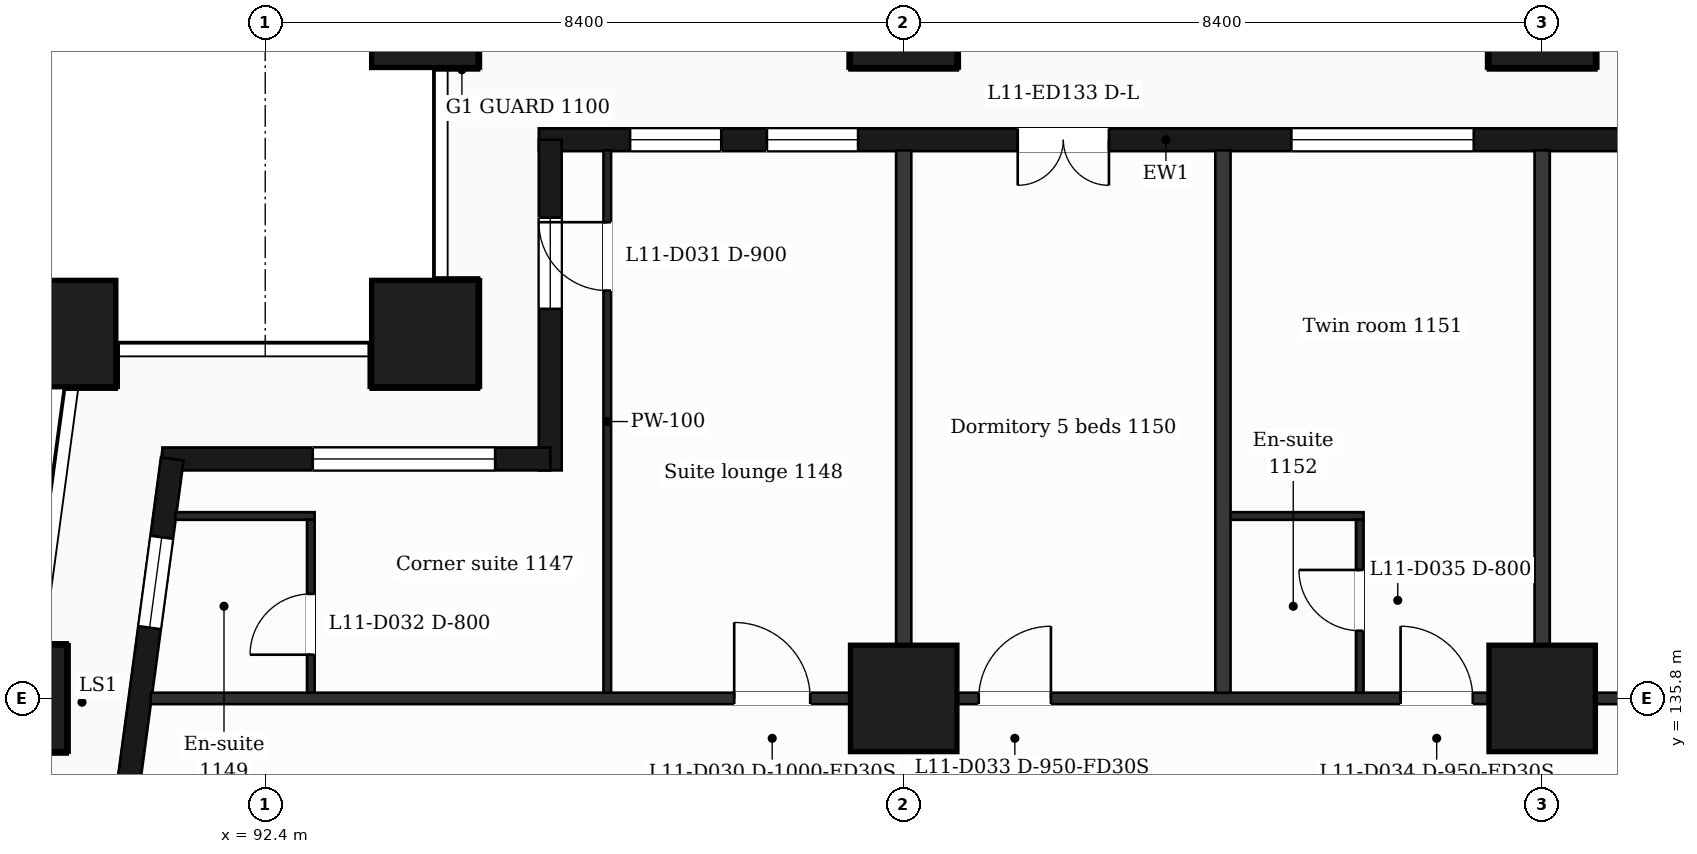
"""IFC4 building model, lengths in metres.
Left out: names, types, materials, properties, quantities, classifications, styles, units other than length and angle.
Written with IfcOpenShell. Run it as: python <this file> out.ifc"""

import sys

from ifc_helpers import new_model, si_unit, direction, frame, frame_2d, origin, origin_2d, place, context, subcontext, project, spatial, rectangle, extrude, element, fill, save


model = new_model("IFC4")
c1 = context("Model", 3, precision=1e-05, world=origin(), true_north=direction((0.0, 1.0)))
c2 = subcontext(c1, "Body", "Model", "MODEL_VIEW")
j1 = project(units=[si_unit("LENGTHUNIT", "METRE"), si_unit("PLANEANGLEUNIT", "RADIAN")], contexts=[c1])
p1 = place(None, origin())
s1 = spatial("IfcSite", under=j1, at=p1, CompositionType="ELEMENT")
p2 = place(p1, origin())
s2 = spatial("IfcBuilding", under=s1, at=p2, CompositionType="ELEMENT")
p3 = place(p2, frame((0.0, 0.0, 56.5)))
s3 = spatial("IfcBuildingStorey", under=s2, at=p3, CompositionType="ELEMENT", Elevation=56.5)
for number, where, z_axis, x_axis in (
    (1, (94.5, 140.6, 0.0), (0.0, 0.0, 1.0), (1.0, 0.0, 0.0)),
    (2, (89.735, 140.6, 0.0), (0.0, 0.0, 1.0), (1.0, 0.0, 0.0)),
    (3, (100.8, 135.8, 0.0), (0.0, 0.0, 1.0), (1.0, 0.0, 0.0)),
    (4, (109.2, 135.8, 0.0), (0.0, 0.0, 1.0), (1.0, 0.0, 0.0)),
    (5, (89.088, 135.8, 0.0), (0.0, 0.0, 1.0), (1.0, 0.0, 0.0)),
    (6, (100.8, 144.8, 0.0), (0.0, 0.0, 1.0), (1.0, 0.0, 0.0)),
    (7, (109.2, 144.8, 0.0), (0.0, 0.0, 1.0), (1.0, 0.0, 0.0)),
    (8, (94.5, 144.8, 0.0), (0.0, 0.0, 1.0), (1.0, 0.0, 0.0)),
):
    element("IfcColumn", number, at=place(p3, frame(where, z_axis=z_axis, x_axis=x_axis)), inside=s3, PredefinedType="COLUMN", context=c2, shape_type="SweptSolid", body=[
        extrude(rectangle(XDim=1.4, YDim=1.4, at=origin_2d()), origin(), (0.0, 0.0, 1.0), 3.5),
    ])
p4 = place(p3, frame((112.5, 143.15, 0.0), z_axis=(0.0, 0.0, 1.0), x_axis=(-1.0, 0.0, 0.0)))
e9 = element("IfcWall", 9, at=p4, inside=s3, PredefinedType="SOLIDWALL", context=c2, shape_type="SweptSolid", body=[
    extrude(rectangle(XDim=16.5, YDim=0.3, at=frame_2d((8.25, 0.0))), origin(), (0.0, 0.0, 1.0), 3.18),
])
p5 = place(p4, frame((1.1, 0.0, 0.9)))
e10 = element("IfcOpeningElement", 10, at=p5, cuts=e9, PredefinedType="OPENING", context=c2, shape_type="SweptSolid", body=[
    extrude(rectangle(XDim=1.2, YDim=2.1, at=frame_2d((0.6, 1.05))), frame((0.0, 0.16, 0.0), z_axis=(0.0, -1.0, 0.0), x_axis=(1.0, 0.0, 0.0)), (0.0, 0.0, 1.0), 0.32),
])
p6 = place(p4, frame((4.2, 0.0, 0.9)))
e11 = element("IfcOpeningElement", 11, at=p6, cuts=e9, PredefinedType="OPENING", context=c2, shape_type="SweptSolid", body=[
    extrude(rectangle(XDim=2.4, YDim=2.1, at=frame_2d((1.2, 1.05))), frame((0.0, 0.16, 0.0), z_axis=(0.0, -1.0, 0.0), x_axis=(1.0, 0.0, 0.0)), (0.0, 0.0, 1.0), 0.32),
])
p7 = place(p4, frame((9.0, 0.0, 0.0)))
e12 = element("IfcOpeningElement", 12, at=p7, cuts=e9, PredefinedType="OPENING", context=c2, shape_type="SweptSolid", body=[
    extrude(rectangle(XDim=1.2, YDim=2.4, at=frame_2d((0.6, 1.2))), frame((0.0, 0.16, 0.0), z_axis=(0.0, -1.0, 0.0), x_axis=(1.0, 0.0, 0.0)), (0.0, 0.0, 1.0), 0.32),
])
p8 = place(p4, frame((12.3, 0.0, 0.9)))
e13 = element("IfcOpeningElement", 13, at=p8, cuts=e9, PredefinedType="OPENING", context=c2, shape_type="SweptSolid", body=[
    extrude(rectangle(XDim=1.2, YDim=2.1, at=frame_2d((0.6, 1.05))), frame((0.0, 0.16, 0.0), z_axis=(0.0, -1.0, 0.0), x_axis=(1.0, 0.0, 0.0)), (0.0, 0.0, 1.0), 0.32),
])
p9 = place(p4, frame((14.1, 0.0, 0.9)))
e14 = element("IfcOpeningElement", 14, at=p9, cuts=e9, PredefinedType="OPENING", context=c2, shape_type="SweptSolid", body=[
    extrude(rectangle(XDim=1.2, YDim=2.1, at=frame_2d((0.6, 1.05))), frame((0.0, 0.16, 0.0), z_axis=(0.0, -1.0, 0.0), x_axis=(1.0, 0.0, 0.0)), (0.0, 0.0, 1.0), 0.32),
])
p10 = place(p3, frame((96.15, 143.15, 0.0), z_axis=(0.0, 0.0, 1.0), x_axis=(0.0, -1.0, 0.0)))
e15 = element("IfcWall", 15, at=p10, inside=s3, PredefinedType="SOLIDWALL", context=c2, shape_type="SweptSolid", body=[
    extrude(rectangle(XDim=4.35, YDim=0.3, at=frame_2d((2.175, 0.0))), origin(), (0.0, 0.0, 1.0), 3.18),
])
p11 = place(p10, frame((1.025, 0.0, 0.9)))
e16 = element("IfcOpeningElement", 16, at=p11, cuts=e15, PredefinedType="OPENING", context=c2, shape_type="SweptSolid", body=[
    extrude(rectangle(XDim=1.2, YDim=2.1, at=frame_2d((0.6, 1.05))), frame((0.0, 0.16, 0.0), z_axis=(0.0, -1.0, 0.0), x_axis=(1.0, 0.0, 0.0)), (0.0, 0.0, 1.0), 0.32),
])
p12 = place(p3, frame((96.15, 138.95, 0.0), z_axis=(0.0, 0.0, 1.0), x_axis=(-1.0, 0.0, 0.0)))
e17 = element("IfcWall", 17, at=p12, inside=s3, PredefinedType="SOLIDWALL", context=c2, shape_type="SweptSolid", body=[
    extrude(rectangle(XDim=5.104, YDim=0.3, at=frame_2d((2.552, 0.0))), origin(), (0.0, 0.0, 1.0), 3.18),
])
p13 = place(p12, frame((0.725, 0.0, 0.9)))
e18 = element("IfcOpeningElement", 18, at=p13, cuts=e17, PredefinedType="OPENING", context=c2, shape_type="SweptSolid", body=[
    extrude(rectangle(XDim=2.4, YDim=2.1, at=frame_2d((1.2, 1.05))), frame((0.0, 0.16, 0.0), z_axis=(0.0, -1.0, 0.0), x_axis=(1.0, 0.0, 0.0)), (0.0, 0.0, 1.0), 0.32),
])
p14 = place(p3, frame((91.177, 138.95, 0.0), z_axis=(0.0, 0.0, 1.0), x_axis=(-0.133426664613, -0.991058689065, 0.0)))
e19 = element("IfcWall", 19, at=p14, inside=s3, PredefinedType="SOLIDWALL", context=c2, shape_type="SweptSolid", body=[
    extrude(rectangle(XDim=6.609, YDim=0.3, at=frame_2d((3.305, 0.0))), origin(), (0.0, 0.0, 1.0), 3.18),
])
p15 = place(p14, frame((1.039, 0.0, 0.9)))
e20 = element("IfcOpeningElement", 20, at=p15, cuts=e19, PredefinedType="OPENING", context=c2, shape_type="SweptSolid", body=[
    extrude(rectangle(XDim=1.2, YDim=2.1, at=frame_2d((0.6, 1.05))), frame((0.0, 0.16, 0.0), z_axis=(0.0, -1.0, 0.0), x_axis=(1.0, 0.0, 0.0)), (0.0, 0.0, 1.0), 0.32),
])
p16 = place(p14, frame((4.294, 0.0, 0.0)))
e21 = element("IfcOpeningElement", 21, at=p16, cuts=e19, PredefinedType="OPENING", context=c2, shape_type="SweptSolid", body=[
    extrude(rectangle(XDim=1.2, YDim=2.4, at=frame_2d((0.6, 1.2))), frame((0.0, 0.16, 0.0), z_axis=(0.0, -1.0, 0.0), x_axis=(1.0, 0.0, 0.0)), (0.0, 0.0, 1.0), 0.32),
])
p17 = place(p3, frame((90.895, 135.8, 0.0), z_axis=(0.0, 0.0, 1.0), x_axis=(1.0, 0.0, 0.0)))
e22 = element("IfcWall", 22, at=p17, inside=s3, PredefinedType="PARTITIONING", context=c2, shape_type="SweptSolid", body=[
    extrude(rectangle(XDim=45.011, YDim=0.15, at=frame_2d((22.505, 0.0))), origin(), (0.0, 0.0, 1.0), 3.18),
])
p18 = place(p17, frame((7.675, 0.0, 0.0)))
e23 = element("IfcOpeningElement", 23, at=p18, cuts=e22, PredefinedType="OPENING", context=c2, shape_type="SweptSolid", body=[
    extrude(rectangle(XDim=1.0, YDim=2.1, at=frame_2d((0.5, 1.05))), frame((0.0, 0.085, 0.0), z_axis=(0.0, -1.0, 0.0), x_axis=(1.0, 0.0, 0.0)), (0.0, 0.0, 1.0), 0.17),
])
p19 = place(p17, frame((10.892, 0.0, 0.0)))
e24 = element("IfcOpeningElement", 24, at=p19, cuts=e22, PredefinedType="OPENING", context=c2, shape_type="SweptSolid", body=[
    extrude(rectangle(XDim=0.95, YDim=2.1, at=frame_2d((0.475, 1.05))), frame((0.0, 0.085, 0.0), z_axis=(0.0, -1.0, 0.0), x_axis=(1.0, 0.0, 0.0)), (0.0, 0.0, 1.0), 0.17),
])
p20 = place(p17, frame((16.442, 0.0, 0.0)))
e25 = element("IfcOpeningElement", 25, at=p20, cuts=e22, PredefinedType="OPENING", context=c2, shape_type="SweptSolid", body=[
    extrude(rectangle(XDim=0.95, YDim=2.1, at=frame_2d((0.475, 1.05))), frame((0.0, 0.085, 0.0), z_axis=(0.0, -1.0, 0.0), x_axis=(1.0, 0.0, 0.0)), (0.0, 0.0, 1.0), 0.17),
])
p21 = place(p17, frame((22.368, 0.0, 0.0)))
e26 = element("IfcOpeningElement", 26, at=p21, cuts=e22, PredefinedType="OPENING", context=c2, shape_type="SweptSolid", body=[
    extrude(rectangle(XDim=0.95, YDim=2.1, at=frame_2d((0.475, 1.05))), frame((0.0, 0.085, 0.0), z_axis=(0.0, -1.0, 0.0), x_axis=(1.0, 0.0, 0.0)), (0.0, 0.0, 1.0), 0.17),
])
p22 = place(p17, frame((31.825, 0.0, 0.0)))
e27 = element("IfcOpeningElement", 27, at=p22, cuts=e22, PredefinedType="OPENING", context=c2, shape_type="SweptSolid", body=[
    extrude(rectangle(XDim=0.95, YDim=2.1, at=frame_2d((0.475, 1.05))), frame((0.0, 0.085, 0.0), z_axis=(0.0, -1.0, 0.0), x_axis=(1.0, 0.0, 0.0)), (0.0, 0.0, 1.0), 0.17),
])
p23 = place(p17, frame((36.775, 0.0, 0.0)))
e28 = element("IfcOpeningElement", 28, at=p23, cuts=e22, PredefinedType="OPENING", context=c2, shape_type="SweptSolid", body=[
    extrude(rectangle(XDim=1.0, YDim=2.1, at=frame_2d((0.5, 1.05))), frame((0.0, 0.085, 0.0), z_axis=(0.0, -1.0, 0.0), x_axis=(1.0, 0.0, 0.0)), (0.0, 0.0, 1.0), 0.17),
])
p24 = place(p3, frame((91.218, 138.2, 0.0), z_axis=(0.0, 0.0, 1.0), x_axis=(1.0, 0.0, 0.0)))
e29 = element("IfcWall", 29, at=p24, inside=s3, PredefinedType="PARTITIONING", context=c2, shape_type="SweptSolid", body=[
    extrude(rectangle(XDim=1.832, YDim=0.1, at=frame_2d((0.916, 0.0))), origin(), (0.0, 0.0, 1.0), 3.18),
])
p25 = place(p3, frame((105.0, 138.2, 0.0), z_axis=(0.0, 0.0, 1.0), x_axis=(1.0, 0.0, 0.0)))
e30 = element("IfcWall", 30, at=p25, inside=s3, PredefinedType="PARTITIONING", context=c2, shape_type="SweptSolid", body=[
    extrude(rectangle(XDim=1.85, YDim=0.1, at=frame_2d((0.925, 0.0))), origin(), (0.0, 0.0, 1.0), 3.18),
])
p26 = place(p3, frame((93.0, 135.875, 0.0), z_axis=(0.0, 0.0, 1.0), x_axis=(0.0, 1.0, 0.0)))
e31 = element("IfcWall", 31, at=p26, inside=s3, PredefinedType="PARTITIONING", context=c2, shape_type="SweptSolid", body=[
    extrude(rectangle(XDim=2.275, YDim=0.1, at=frame_2d((1.137, 0.0))), origin(), (0.0, 0.0, 1.0), 3.18),
])
p27 = place(p26, frame((0.5, 0.0, 0.0)))
e32 = element("IfcOpeningElement", 32, at=p27, cuts=e31, PredefinedType="OPENING", context=c2, shape_type="SweptSolid", body=[
    extrude(rectangle(XDim=0.8, YDim=2.1, at=frame_2d((0.4, 1.05))), frame((0.0, 0.06, 0.0), z_axis=(0.0, -1.0, 0.0), x_axis=(1.0, 0.0, 0.0)), (0.0, 0.0, 1.0), 0.12),
])
p28 = place(p3, frame((96.9, 135.875, 0.0), z_axis=(0.0, 0.0, 1.0), x_axis=(0.0, 1.0, 0.0)))
e33 = element("IfcWall", 33, at=p28, inside=s3, PredefinedType="PARTITIONING", context=c2, shape_type="SweptSolid", body=[
    extrude(rectangle(XDim=7.135, YDim=0.1, at=frame_2d((3.567, 0.0))), origin(), (0.0, 0.0, 1.0), 3.18),
])
p29 = place(p28, frame((5.29, 0.0, 0.0)))
e34 = element("IfcOpeningElement", 34, at=p29, cuts=e33, PredefinedType="OPENING", context=c2, shape_type="SweptSolid", body=[
    extrude(rectangle(XDim=0.9, YDim=2.1, at=frame_2d((0.45, 1.05))), frame((0.0, 0.06, 0.0), z_axis=(0.0, -1.0, 0.0), x_axis=(1.0, 0.0, 0.0)), (0.0, 0.0, 1.0), 0.12),
])
for number, where, z_axis, x_axis in (
    (35, (100.8, 135.875, 0.0), (0.0, 0.0, 1.0), (0.0, 1.0, 0.0)),
    (36, (105.0, 135.875, 0.0), (0.0, 0.0, 1.0), (0.0, 1.0, 0.0)),
):
    element("IfcWall", number, at=place(p3, frame(where, z_axis=z_axis, x_axis=x_axis)), inside=s3, PredefinedType="PARTITIONING", context=c2, shape_type="SweptSolid", body=[
        extrude(rectangle(XDim=7.135, YDim=0.2, at=frame_2d((3.567, 0.0))), origin(), (0.0, 0.0, 1.0), 3.18),
    ])
p30 = place(p3, frame((106.8, 135.875, 0.0), z_axis=(0.0, 0.0, 1.0), x_axis=(0.0, 1.0, 0.0)))
e37 = element("IfcWall", 37, at=p30, inside=s3, PredefinedType="PARTITIONING", context=c2, shape_type="SweptSolid", body=[
    extrude(rectangle(XDim=2.275, YDim=0.1, at=frame_2d((1.137, 0.0))), origin(), (0.0, 0.0, 1.0), 3.18),
])
p31 = place(p30, frame((0.815, 0.0, 0.0)))
e38 = element("IfcOpeningElement", 38, at=p31, cuts=e37, PredefinedType="OPENING", context=c2, shape_type="SweptSolid", body=[
    extrude(rectangle(XDim=0.8, YDim=2.1, at=frame_2d((0.4, 1.05))), frame((0.0, 0.06, 0.0), z_axis=(0.0, -1.0, 0.0), x_axis=(1.0, 0.0, 0.0)), (0.0, 0.0, 1.0), 0.12),
])
p32 = place(p3, frame((109.2, 135.875, 0.0), z_axis=(0.0, 0.0, 1.0), x_axis=(0.0, 1.0, 0.0)))
e39 = element("IfcWall", 39, at=p32, inside=s3, PredefinedType="PARTITIONING", context=c2, shape_type="SweptSolid", body=[
    extrude(rectangle(XDim=7.135, YDim=0.2, at=frame_2d((3.567, 0.0))), origin(), (0.0, 0.0, 1.0), 3.18),
])
p33 = place(p5, origin())
e40 = element("IfcWindow", 40, at=p33, inside=s3, PartitioningType="SINGLE_PANEL", PredefinedType="WINDOW", context=c2, shape_type="SweptSolid", body=[
    extrude(rectangle(XDim=1.2, YDim=2.1, at=frame_2d((0.6, 1.05))), frame((0.0, 0.03, 0.0), z_axis=(0.0, -1.0, 0.0), x_axis=(1.0, 0.0, 0.0)), (0.0, 0.0, 1.0), 0.06),
])
fill(e10, e40)
p34 = place(p6, origin())
e41 = element("IfcWindow", 41, at=p34, inside=s3, PartitioningType="SINGLE_PANEL", PredefinedType="WINDOW", context=c2, shape_type="SweptSolid", body=[
    extrude(rectangle(XDim=2.4, YDim=2.1, at=frame_2d((1.2, 1.05))), frame((0.0, 0.03, 0.0), z_axis=(0.0, -1.0, 0.0), x_axis=(1.0, 0.0, 0.0)), (0.0, 0.0, 1.0), 0.06),
])
fill(e11, e41)
p35 = place(p7, origin())
e42 = element("IfcDoor", 42, at=p35, inside=s3, OperationType="DOUBLE_DOOR_SINGLE_SWING", PredefinedType="DOOR", context=c2, shape_type="SweptSolid", body=[
    extrude(rectangle(XDim=1.2, YDim=2.4, at=frame_2d((0.6, 1.2))), frame((0.0, 0.025, 0.0), z_axis=(0.0, -1.0, 0.0), x_axis=(1.0, 0.0, 0.0)), (0.0, 0.0, 1.0), 0.05),
])
fill(e12, e42)
p36 = place(p8, origin())
e43 = element("IfcWindow", 43, at=p36, inside=s3, PartitioningType="SINGLE_PANEL", PredefinedType="WINDOW", context=c2, shape_type="SweptSolid", body=[
    extrude(rectangle(XDim=1.2, YDim=2.1, at=frame_2d((0.6, 1.05))), frame((0.0, 0.03, 0.0), z_axis=(0.0, -1.0, 0.0), x_axis=(1.0, 0.0, 0.0)), (0.0, 0.0, 1.0), 0.06),
])
fill(e13, e43)
p37 = place(p9, origin())
e44 = element("IfcWindow", 44, at=p37, inside=s3, PartitioningType="SINGLE_PANEL", PredefinedType="WINDOW", context=c2, shape_type="SweptSolid", body=[
    extrude(rectangle(XDim=1.2, YDim=2.1, at=frame_2d((0.6, 1.05))), frame((0.0, 0.03, 0.0), z_axis=(0.0, -1.0, 0.0), x_axis=(1.0, 0.0, 0.0)), (0.0, 0.0, 1.0), 0.06),
])
fill(e14, e44)
p38 = place(p11, origin())
e45 = element("IfcWindow", 45, at=p38, inside=s3, PartitioningType="SINGLE_PANEL", PredefinedType="WINDOW", context=c2, shape_type="SweptSolid", body=[
    extrude(rectangle(XDim=1.2, YDim=2.1, at=frame_2d((0.6, 1.05))), frame((0.0, 0.03, 0.0), z_axis=(0.0, -1.0, 0.0), x_axis=(1.0, 0.0, 0.0)), (0.0, 0.0, 1.0), 0.06),
])
fill(e16, e45)
p39 = place(p13, origin())
e46 = element("IfcWindow", 46, at=p39, inside=s3, PartitioningType="SINGLE_PANEL", PredefinedType="WINDOW", context=c2, shape_type="SweptSolid", body=[
    extrude(rectangle(XDim=2.4, YDim=2.1, at=frame_2d((1.2, 1.05))), frame((0.0, 0.03, 0.0), z_axis=(0.0, -1.0, 0.0), x_axis=(1.0, 0.0, 0.0)), (0.0, 0.0, 1.0), 0.06),
])
fill(e18, e46)
p40 = place(p15, origin())
e47 = element("IfcWindow", 47, at=p40, inside=s3, PartitioningType="SINGLE_PANEL", PredefinedType="WINDOW", context=c2, shape_type="SweptSolid", body=[
    extrude(rectangle(XDim=1.2, YDim=2.1, at=frame_2d((0.6, 1.05))), frame((0.0, 0.03, 0.0), z_axis=(0.0, -1.0, 0.0), x_axis=(1.0, 0.0, 0.0)), (0.0, 0.0, 1.0), 0.06),
])
fill(e20, e47)
p41 = place(p18, origin())
e48 = element("IfcDoor", 48, at=p41, inside=s3, OperationType="SINGLE_SWING_LEFT", PredefinedType="DOOR", context=c2, shape_type="SweptSolid", body=[
    extrude(rectangle(XDim=1.0, YDim=2.1, at=frame_2d((0.5, 1.05))), frame((0.0, 0.025, 0.0), z_axis=(0.0, -1.0, 0.0), x_axis=(1.0, 0.0, 0.0)), (0.0, 0.0, 1.0), 0.05),
])
fill(e23, e48)
p42 = place(p29, origin())
e49 = element("IfcDoor", 49, at=p42, inside=s3, OperationType="SINGLE_SWING_RIGHT", PredefinedType="DOOR", context=c2, shape_type="SweptSolid", body=[
    extrude(rectangle(XDim=0.9, YDim=2.1, at=frame_2d((0.45, 1.05))), frame((0.0, 0.025, 0.0), z_axis=(0.0, -1.0, 0.0), x_axis=(1.0, 0.0, 0.0)), (0.0, 0.0, 1.0), 0.05),
])
fill(e34, e49)
p43 = place(p27, origin())
e50 = element("IfcDoor", 50, at=p43, inside=s3, OperationType="SINGLE_SWING_LEFT", PredefinedType="DOOR", context=c2, shape_type="SweptSolid", body=[
    extrude(rectangle(XDim=0.8, YDim=2.1, at=frame_2d((0.4, 1.05))), frame((0.0, 0.025, 0.0), z_axis=(0.0, -1.0, 0.0), x_axis=(1.0, 0.0, 0.0)), (0.0, 0.0, 1.0), 0.05),
])
fill(e32, e50)
p44 = place(p19, origin())
e51 = element("IfcDoor", 51, at=p44, inside=s3, OperationType="SINGLE_SWING_RIGHT", PredefinedType="DOOR", context=c2, shape_type="SweptSolid", body=[
    extrude(rectangle(XDim=0.95, YDim=2.1, at=frame_2d((0.475, 1.05))), frame((0.0, 0.025, 0.0), z_axis=(0.0, -1.0, 0.0), x_axis=(1.0, 0.0, 0.0)), (0.0, 0.0, 1.0), 0.05),
])
fill(e24, e51)
p45 = place(p20, origin())
e52 = element("IfcDoor", 52, at=p45, inside=s3, OperationType="SINGLE_SWING_LEFT", PredefinedType="DOOR", context=c2, shape_type="SweptSolid", body=[
    extrude(rectangle(XDim=0.95, YDim=2.1, at=frame_2d((0.475, 1.05))), frame((0.0, 0.025, 0.0), z_axis=(0.0, -1.0, 0.0), x_axis=(1.0, 0.0, 0.0)), (0.0, 0.0, 1.0), 0.05),
])
fill(e25, e52)
p46 = place(p31, origin())
e53 = element("IfcDoor", 53, at=p46, inside=s3, OperationType="SINGLE_SWING_RIGHT", PredefinedType="DOOR", context=c2, shape_type="SweptSolid", body=[
    extrude(rectangle(XDim=0.8, YDim=2.1, at=frame_2d((0.4, 1.05))), frame((0.0, 0.025, 0.0), z_axis=(0.0, -1.0, 0.0), x_axis=(1.0, 0.0, 0.0)), (0.0, 0.0, 1.0), 0.05),
])
fill(e38, e53)
save(model, sys.argv[1])
